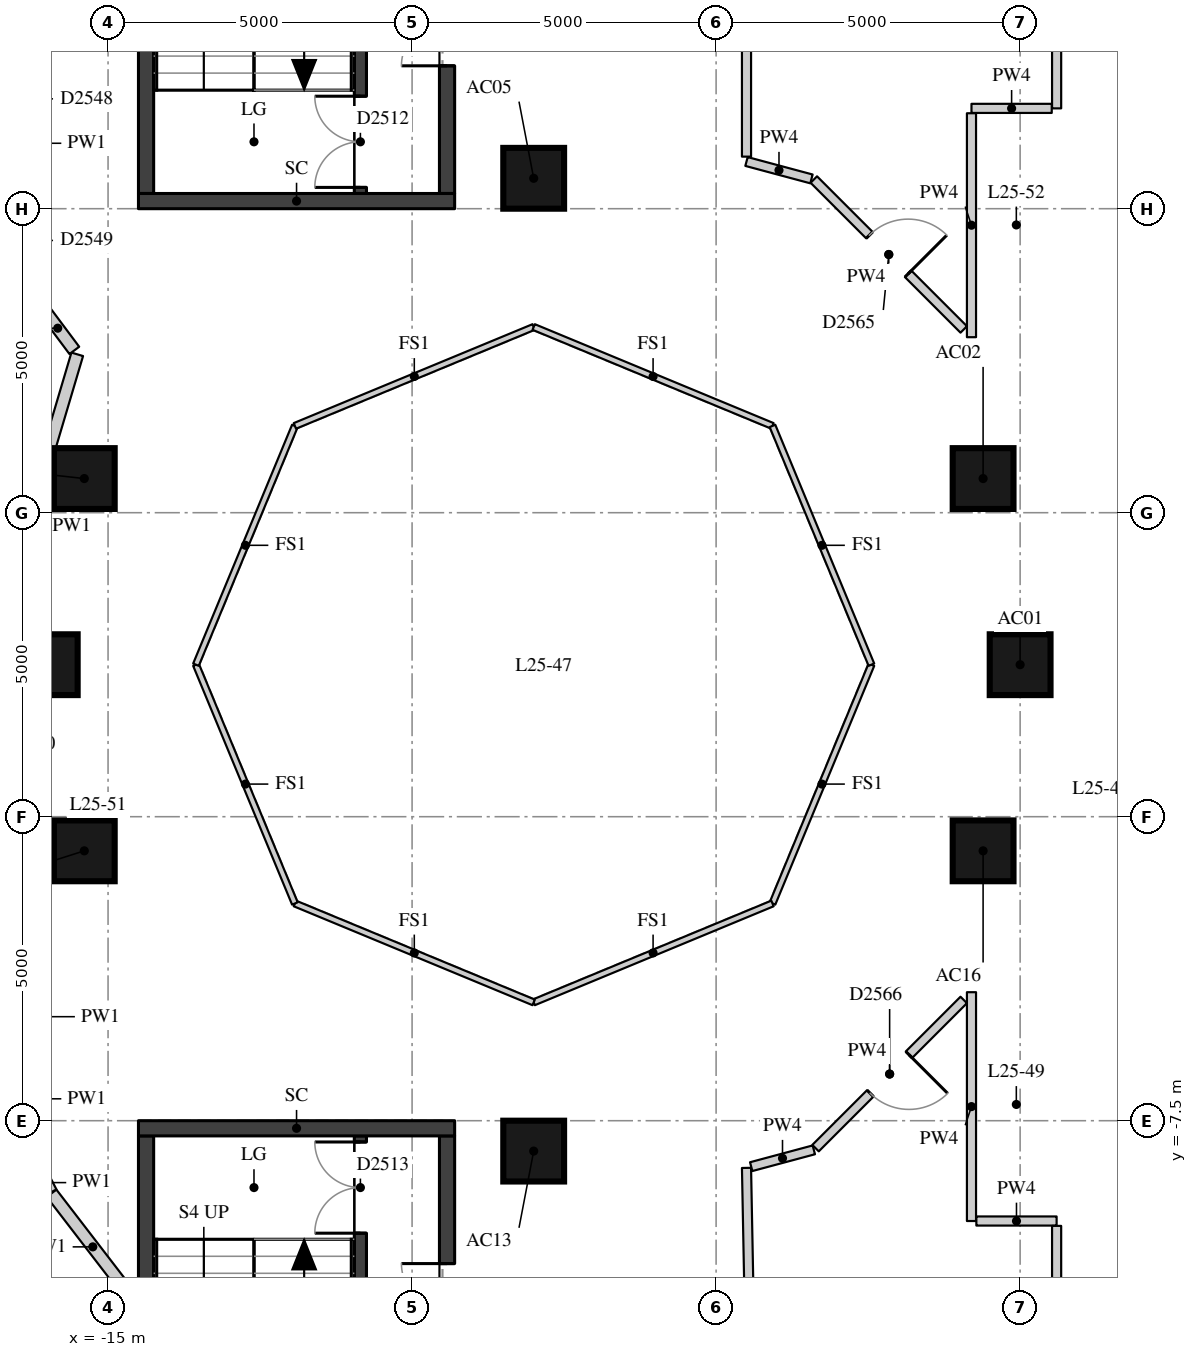
"""IFC4 building model, lengths in metres.
Left out: names, types, materials, properties, quantities, classifications, styles, units other than length and angle.
Written with IfcOpenShell. Run it as: python <this file> out.ifc"""

import sys

from ifc_helpers import new_model, si_unit, direction, frame, frame_2d, origin, origin_2d, place, context, subcontext, project, spatial, rectangle, extrude, element, fill, save


model = new_model("IFC4")
c1 = context("Model", 3, precision=1e-05, world=origin(), true_north=direction((0.0, 1.0)))
c2 = subcontext(c1, "Body", "Model", "MODEL_VIEW")
j1 = project(units=[si_unit("LENGTHUNIT", "METRE"), si_unit("PLANEANGLEUNIT", "RADIAN")], contexts=[c1])
p1 = place(None, origin())
s1 = spatial("IfcSite", under=j1, at=p1, CompositionType="ELEMENT")
p2 = place(p1, origin())
s2 = spatial("IfcBuilding", under=s1, at=p2, CompositionType="ELEMENT")
p3 = place(p2, frame((0.0, 0.0, 92.2)))
s3 = spatial("IfcBuildingStorey", under=s2, at=p3, CompositionType="ELEMENT", Elevation=92.2)
for number, where, z_axis, x_axis in (
    (1, (0.0, 0.0, 0.0), (0.0, 0.0, 1.0), (1.0, 0.0, 0.0)),
    (2, (-0.609, 3.062, 0.0), (0.0, 0.0, 1.0), (1.0, 0.0, 0.0)),
    (3, (-8.0, 8.0, 0.0), (0.0, 0.0, 1.0), (1.0, 0.0, 0.0)),
    (4, (-15.391, 3.062, 0.0), (0.0, 0.0, 1.0), (1.0, 0.0, 0.0)),
    (5, (-16.0, 0.0, 0.0), (0.0, 0.0, 1.0), (1.0, 0.0, 0.0)),
    (6, (-15.391, -3.062, 0.0), (0.0, 0.0, 1.0), (1.0, 0.0, 0.0)),
    (7, (-8.0, -8.0, 0.0), (0.0, 0.0, 1.0), (1.0, 0.0, 0.0)),
    (8, (-0.609, -3.062, 0.0), (0.0, 0.0, 1.0), (1.0, 0.0, 0.0)),
):
    element("IfcColumn", number, at=place(p3, frame(where, z_axis=z_axis, x_axis=x_axis)), inside=s3, PredefinedType="COLUMN", context=c2, shape_type="SweptSolid", body=[
        extrude(rectangle(XDim=1.0, YDim=1.0, at=origin_2d()), origin(), (0.0, 0.0, 1.0), 3.3),
    ])
p4 = place(p3, frame((-10.85, 7.75, 0.0), z_axis=(0.0, 0.0, 1.0), x_axis=(0.0, 1.0, 0.0)))
e9 = element("IfcWall", 9, at=p4, inside=s3, PredefinedType="SHEAR", context=c2, shape_type="SweptSolid", body=[
    extrude(rectangle(XDim=6.0, YDim=0.2, at=frame_2d((3.0, 0.0))), origin(), (0.0, 0.0, 1.0), 3.02),
])
p5 = place(p4, frame((0.1, 0.0, 0.0)))
e10 = element("IfcOpeningElement", 10, at=p5, cuts=e9, PredefinedType="OPENING", context=c2, shape_type="SweptSolid", body=[
    extrude(rectangle(XDim=1.5, YDim=2.1, at=frame_2d((0.75, 1.05))), frame((0.0, 0.11, 0.0), z_axis=(0.0, -1.0, 0.0), x_axis=(1.0, 0.0, 0.0)), (0.0, 0.0, 1.0), 0.22),
])
p6 = place(p3, frame((-10.85, -13.75, 0.0), z_axis=(0.0, 0.0, 1.0), x_axis=(0.0, 1.0, 0.0)))
e11 = element("IfcWall", 11, at=p6, inside=s3, PredefinedType="SHEAR", context=c2, shape_type="SweptSolid", body=[
    extrude(rectangle(XDim=6.0, YDim=0.2, at=frame_2d((3.0, 0.0))), origin(), (0.0, 0.0, 1.0), 3.02),
])
p7 = place(p6, frame((4.4, 0.0, 0.0)))
e12 = element("IfcOpeningElement", 12, at=p7, cuts=e11, PredefinedType="OPENING", context=c2, shape_type="SweptSolid", body=[
    extrude(rectangle(XDim=1.5, YDim=2.1, at=frame_2d((0.75, 1.05))), frame((0.0, 0.11, 0.0), z_axis=(0.0, -1.0, 0.0), x_axis=(1.0, 0.0, 0.0)), (0.0, 0.0, 1.0), 0.22),
])
p8 = place(p3, frame((-14.375, 7.75, -0.28), z_axis=(0.0, 0.0, 1.0), x_axis=(0.0, 1.0, 0.0)))
e13 = element("IfcWall", 13, at=p8, inside=s3, PredefinedType="SHEAR", context=c2, shape_type="SweptSolid", body=[
    extrude(rectangle(XDim=6.0, YDim=0.25, at=frame_2d((3.0, 0.0))), origin(), (0.0, 0.0, 1.0), 3.3),
])
p9 = place(p3, frame((-9.425, 7.75, -0.28), z_axis=(0.0, 0.0, 1.0), x_axis=(0.0, 1.0, 0.0)))
e14 = element("IfcWall", 14, at=p9, inside=s3, PredefinedType="SHEAR", context=c2, shape_type="SweptSolid", body=[
    extrude(rectangle(XDim=6.0, YDim=0.25, at=frame_2d((3.0, 0.0))), origin(), (0.0, 0.0, 1.0), 3.3),
])
p10 = place(p9, frame((2.1, 0.0, 0.28)))
e15 = element("IfcOpeningElement", 15, at=p10, cuts=e14, PredefinedType="OPENING", context=c2, shape_type="SweptSolid", body=[
    extrude(rectangle(XDim=1.5, YDim=2.1, at=frame_2d((0.75, 1.05))), frame((0.0, 0.135, 0.0), z_axis=(0.0, -1.0, 0.0), x_axis=(1.0, 0.0, 0.0)), (0.0, 0.0, 1.0), 0.27),
])
p11 = place(p3, frame((-14.5, 7.625, -0.28), z_axis=(0.0, 0.0, 1.0), x_axis=(1.0, 0.0, 0.0)))
e16 = element("IfcWall", 16, at=p11, inside=s3, PredefinedType="SHEAR", context=c2, shape_type="SweptSolid", body=[
    extrude(rectangle(XDim=5.2, YDim=0.25, at=frame_2d((2.6, 0.0))), origin(), (0.0, 0.0, 1.0), 3.3),
])
p12 = place(p3, frame((-14.375, -13.75, -0.28), z_axis=(0.0, 0.0, 1.0), x_axis=(0.0, 1.0, 0.0)))
e17 = element("IfcWall", 17, at=p12, inside=s3, PredefinedType="SHEAR", context=c2, shape_type="SweptSolid", body=[
    extrude(rectangle(XDim=6.0, YDim=0.25, at=frame_2d((3.0, 0.0))), origin(), (0.0, 0.0, 1.0), 3.3),
])
p13 = place(p3, frame((-9.425, -13.75, -0.28), z_axis=(0.0, 0.0, 1.0), x_axis=(0.0, 1.0, 0.0)))
e18 = element("IfcWall", 18, at=p13, inside=s3, PredefinedType="SHEAR", context=c2, shape_type="SweptSolid", body=[
    extrude(rectangle(XDim=6.0, YDim=0.25, at=frame_2d((3.0, 0.0))), origin(), (0.0, 0.0, 1.0), 3.3),
])
p14 = place(p13, frame((2.4, 0.0, 0.28)))
e19 = element("IfcOpeningElement", 19, at=p14, cuts=e18, PredefinedType="OPENING", context=c2, shape_type="SweptSolid", body=[
    extrude(rectangle(XDim=1.5, YDim=2.1, at=frame_2d((0.75, 1.05))), frame((0.0, 0.135, 0.0), z_axis=(0.0, -1.0, 0.0), x_axis=(1.0, 0.0, 0.0)), (0.0, 0.0, 1.0), 0.27),
])
p15 = place(p3, frame((-14.5, -7.625, -0.28), z_axis=(0.0, 0.0, 1.0), x_axis=(1.0, 0.0, 0.0)))
e20 = element("IfcWall", 20, at=p15, inside=s3, PredefinedType="SHEAR", context=c2, shape_type="SweptSolid", body=[
    extrude(rectangle(XDim=5.2, YDim=0.25, at=frame_2d((2.6, 0.0))), origin(), (0.0, 0.0, 1.0), 3.3),
])
p16 = place(p3, frame((-14.573, -10.456, 0.0), z_axis=(0.0, 0.0, 1.0), x_axis=(-0.60967360535, 0.792652568872, 0.0)))
e21 = element("IfcWall", 21, at=p16, inside=s3, PredefinedType="PARTITIONING", context=c2, shape_type="SweptSolid", body=[
    extrude(rectangle(XDim=2.223, YDim=0.2, at=frame_2d((1.111, 0.0))), origin(), (0.0, 0.0, 1.0), 3.02),
])
p17 = place(p3, frame((-15.938, -8.676, 0.0), z_axis=(0.0, 0.0, 1.0), x_axis=(-0.456525695549, 0.889710227717, 0.0)))
e22 = element("IfcWall", 22, at=p17, inside=s3, PredefinedType="PARTITIONING", context=c2, shape_type="SweptSolid", body=[
    extrude(rectangle(XDim=0.356, YDim=0.2, at=frame_2d((0.178, 0.0))), origin(), (0.0, 0.0, 1.0), 3.02),
])
p18 = place(p3, frame((-17.189, -0.562, 0.0), z_axis=(0.0, 0.0, 1.0), x_axis=(0.28454253649, 0.95866341587, 0.0)))
e23 = element("IfcWall", 23, at=p18, inside=s3, PredefinedType="PARTITIONING", context=c2, shape_type="SweptSolid", body=[
    extrude(rectangle(XDim=5.911, YDim=0.2, at=frame_2d((2.956, 0.0))), origin(), (0.0, 0.0, 1.0), 3.02),
])
p19 = place(p3, frame((-15.555, 5.169, 0.0), z_axis=(0.0, 0.0, 1.0), x_axis=(-0.598284647233, 0.801283645712, 0.0)))
e24 = element("IfcWall", 24, at=p19, inside=s3, PredefinedType="PARTITIONING", context=c2, shape_type="SweptSolid", body=[
    extrude(rectangle(XDim=0.912, YDim=0.2, at=frame_2d((0.456, 0.0))), origin(), (0.0, 0.0, 1.0), 3.02),
])
p20 = place(p3, frame((0.6, 13.205, 0.0), z_axis=(0.0, 0.0, 1.0), x_axis=(0.0, -1.0, 0.0)))
e25 = element("IfcWall", 25, at=p20, inside=s3, PredefinedType="PARTITIONING", context=c2, shape_type="SweptSolid", body=[
    extrude(rectangle(XDim=4.055, YDim=0.15, at=frame_2d((2.027, 0.0))), origin(), (0.0, 0.0, 1.0), 3.02),
])
p21 = place(p3, frame((0.52, 9.15, 0.0), z_axis=(0.0, 0.0, 1.0), x_axis=(-1.0, 0.0, 0.0)))
e26 = element("IfcWall", 26, at=p21, inside=s3, PredefinedType="PARTITIONING", context=c2, shape_type="SweptSolid", body=[
    extrude(rectangle(XDim=1.32, YDim=0.15, at=frame_2d((0.66, 0.0))), origin(), (0.0, 0.0, 1.0), 3.02),
])
p22 = place(p3, frame((-0.8, 9.07, 0.0), z_axis=(0.0, 0.0, 1.0), x_axis=(0.0, -1.0, 0.0)))
e27 = element("IfcWall", 27, at=p22, inside=s3, PredefinedType="PARTITIONING", context=c2, shape_type="SweptSolid", body=[
    extrude(rectangle(XDim=3.683, YDim=0.15, at=frame_2d((1.842, 0.0))), origin(), (0.0, 0.0, 1.0), 3.02),
])
p23 = place(p3, frame((-0.927, 5.514, 0.0), z_axis=(0.0, 0.0, 1.0), x_axis=(-0.707106781187, 0.707106781187, 0.0)))
e28 = element("IfcWall", 28, at=p23, inside=s3, PredefinedType="PARTITIONING", context=c2, shape_type="SweptSolid", body=[
    extrude(rectangle(XDim=3.487, YDim=0.15, at=frame_2d((1.743, 0.0))), origin(), (0.0, 0.0, 1.0), 3.02),
])
p24 = place(p23, frame((1.293, 0.0, 0.0)))
e29 = element("IfcOpeningElement", 29, at=p24, cuts=e28, PredefinedType="OPENING", context=c2, shape_type="SweptSolid", body=[
    extrude(rectangle(XDim=0.9, YDim=2.1, at=frame_2d((0.45, 1.05))), frame((0.0, 0.085, 0.0), z_axis=(0.0, -1.0, 0.0), x_axis=(1.0, 0.0, 0.0)), (0.0, 0.0, 1.0), 0.17),
])
p25 = place(p3, frame((-3.432, 7.99, 0.0), z_axis=(0.0, 0.0, 1.0), x_axis=(-0.965900750832, 0.258912609855, 0.0)))
e30 = element("IfcWall", 30, at=p25, inside=s3, PredefinedType="PARTITIONING", context=c2, shape_type="SweptSolid", body=[
    extrude(rectangle(XDim=1.106, YDim=0.15, at=frame_2d((0.553, 0.0))), origin(), (0.0, 0.0, 1.0), 3.02),
])
p26 = place(p3, frame((-4.5, 8.356, 0.0), z_axis=(0.0, 0.0, 1.0), x_axis=(0.0, 1.0, 0.0)))
e31 = element("IfcWall", 31, at=p26, inside=s3, PredefinedType="PARTITIONING", context=c2, shape_type="SweptSolid", body=[
    extrude(rectangle(XDim=3.631, YDim=0.15, at=frame_2d((1.815, 0.0))), origin(), (0.0, 0.0, 1.0), 3.02),
])
p27 = place(p3, frame((-0.8, -5.386, 0.0), z_axis=(0.0, 0.0, 1.0), x_axis=(0.0, -1.0, 0.0)))
e32 = element("IfcWall", 32, at=p27, inside=s3, PredefinedType="PARTITIONING", context=c2, shape_type="SweptSolid", body=[
    extrude(rectangle(XDim=3.763, YDim=0.15, at=frame_2d((1.882, 0.0))), origin(), (0.0, 0.0, 1.0), 3.02),
])
p28 = place(p3, frame((-0.72, -9.15, 0.0), z_axis=(0.0, 0.0, 1.0), x_axis=(1.0, 0.0, 0.0)))
e33 = element("IfcWall", 33, at=p28, inside=s3, PredefinedType="PARTITIONING", context=c2, shape_type="SweptSolid", body=[
    extrude(rectangle(XDim=1.32, YDim=0.15, at=frame_2d((0.66, 0.0))), origin(), (0.0, 0.0, 1.0), 3.02),
])
p29 = place(p3, frame((0.6, -9.23, 0.0), z_axis=(0.0, 0.0, 1.0), x_axis=(0.0, -1.0, 0.0)))
e34 = element("IfcWall", 34, at=p29, inside=s3, PredefinedType="PARTITIONING", context=c2, shape_type="SweptSolid", body=[
    extrude(rectangle(XDim=4.863, YDim=0.15, at=frame_2d((2.432, 0.0))), origin(), (0.0, 0.0, 1.0), 3.02),
])
p30 = place(p3, frame((-4.42, -12.411, 0.0), z_axis=(0.0, 0.0, 1.0), x_axis=(-0.01930438501, 0.999813652997, 0.0)))
e35 = element("IfcWall", 35, at=p30, inside=s3, PredefinedType="PARTITIONING", context=c2, shape_type="SweptSolid", body=[
    extrude(rectangle(XDim=4.135, YDim=0.15, at=frame_2d((2.068, 0.0))), origin(), (0.0, 0.0, 1.0), 3.02),
])
p31 = place(p3, frame((-4.423, -8.256, 0.0), z_axis=(0.0, 0.0, 1.0), x_axis=(0.965880568435, 0.258987890683, 0.0)))
e36 = element("IfcWall", 36, at=p31, inside=s3, PredefinedType="PARTITIONING", context=c2, shape_type="SweptSolid", body=[
    extrude(rectangle(XDim=1.066, YDim=0.15, at=frame_2d((0.533, 0.0))), origin(), (0.0, 0.0, 1.0), 3.02),
])
p32 = place(p3, frame((-3.365, -7.951, 0.0), z_axis=(0.0, 0.0, 1.0), x_axis=(0.707106781187, 0.707106781187, 0.0)))
e37 = element("IfcWall", 37, at=p32, inside=s3, PredefinedType="PARTITIONING", context=c2, shape_type="SweptSolid", body=[
    extrude(rectangle(XDim=3.447, YDim=0.15, at=frame_2d((1.723, 0.0))), origin(), (0.0, 0.0, 1.0), 3.02),
])
p33 = place(p32, frame((1.273, 0.0, 0.0)))
e38 = element("IfcOpeningElement", 38, at=p33, cuts=e37, PredefinedType="OPENING", context=c2, shape_type="SweptSolid", body=[
    extrude(rectangle(XDim=0.9, YDim=2.1, at=frame_2d((0.45, 1.05))), frame((0.0, 0.085, 0.0), z_axis=(0.0, -1.0, 0.0), x_axis=(1.0, 0.0, 0.0)), (0.0, 0.0, 1.0), 0.17),
])
for number, where, z_axis, x_axis in (
    (39, (-2.446, 0.0, 0.0), (0.0, 0.0, 1.0), (-0.383, -0.924, 0.0)),
    (40, (-4.073, -3.927, 0.0), (0.0, 0.0, 1.0), (-0.924, -0.383, 0.0)),
    (41, (-8.0, -5.554, 0.0), (0.0, 0.0, 1.0), (-0.924, 0.383, 0.0)),
    (42, (-11.927, -3.927, 0.0), (0.0, 0.0, 1.0), (-0.383, 0.924, 0.0)),
    (43, (-13.554, 0.0, 0.0), (0.0, 0.0, 1.0), (0.383, 0.924, 0.0)),
    (44, (-11.927, 3.927, 0.0), (0.0, 0.0, 1.0), (0.924, 0.383, 0.0)),
    (45, (-8.0, 5.554, 0.0), (0.0, 0.0, 1.0), (0.924, -0.383, 0.0)),
    (46, (-4.073, 3.927, 0.0), (0.0, 0.0, 1.0), (0.383, -0.924, 0.0)),
):
    element("IfcWall", number, at=place(p3, frame(where, z_axis=z_axis, x_axis=x_axis)), inside=s3, PredefinedType="PARTITIONING", context=c2, shape_type="SweptSolid", body=[
        extrude(rectangle(XDim=4.251, YDim=0.1, at=frame_2d((2.125, 0.0))), origin(), (0.0, 0.0, 1.0), 3.02),
    ])
p34 = place(p5, origin())
e47 = element("IfcDoor", 47, at=p34, inside=s3, OperationType="DOUBLE_DOOR_SINGLE_SWING", PredefinedType="DOOR", context=c2, shape_type="SweptSolid", body=[
    extrude(rectangle(XDim=1.5, YDim=2.1, at=frame_2d((0.75, 1.05))), frame((0.0, 0.025, 0.0), z_axis=(0.0, -1.0, 0.0), x_axis=(1.0, 0.0, 0.0)), (0.0, 0.0, 1.0), 0.05),
])
fill(e10, e47)
p35 = place(p7, origin())
e48 = element("IfcDoor", 48, at=p35, inside=s3, OperationType="DOUBLE_DOOR_SINGLE_SWING", PredefinedType="DOOR", context=c2, shape_type="SweptSolid", body=[
    extrude(rectangle(XDim=1.5, YDim=2.1, at=frame_2d((0.75, 1.05))), frame((0.0, 0.025, 0.0), z_axis=(0.0, -1.0, 0.0), x_axis=(1.0, 0.0, 0.0)), (0.0, 0.0, 1.0), 0.05),
])
fill(e12, e48)
p36 = place(p10, origin())
e49 = element("IfcDoor", 49, at=p36, inside=s3, OperationType="DOUBLE_DOOR_SINGLE_SWING", PredefinedType="DOOR", context=c2, shape_type="SweptSolid", body=[
    extrude(rectangle(XDim=1.5, YDim=2.1, at=frame_2d((0.75, 1.05))), frame((0.0, 0.025, 0.0), z_axis=(0.0, -1.0, 0.0), x_axis=(1.0, 0.0, 0.0)), (0.0, 0.0, 1.0), 0.05),
])
fill(e15, e49)
p37 = place(p14, origin())
e50 = element("IfcDoor", 50, at=p37, inside=s3, OperationType="DOUBLE_DOOR_SINGLE_SWING", PredefinedType="DOOR", context=c2, shape_type="SweptSolid", body=[
    extrude(rectangle(XDim=1.5, YDim=2.1, at=frame_2d((0.75, 1.05))), frame((0.0, 0.025, 0.0), z_axis=(0.0, -1.0, 0.0), x_axis=(1.0, 0.0, 0.0)), (0.0, 0.0, 1.0), 0.05),
])
fill(e19, e50)
p38 = place(p24, origin())
e51 = element("IfcDoor", 51, at=p38, inside=s3, OperationType="SINGLE_SWING_RIGHT", PredefinedType="DOOR", context=c2, shape_type="SweptSolid", body=[
    extrude(rectangle(XDim=0.9, YDim=2.1, at=frame_2d((0.45, 1.05))), frame((0.0, 0.025, 0.0), z_axis=(0.0, -1.0, 0.0), x_axis=(1.0, 0.0, 0.0)), (0.0, 0.0, 1.0), 0.05),
])
fill(e29, e51)
p39 = place(p33, origin())
e52 = element("IfcDoor", 52, at=p39, inside=s3, OperationType="SINGLE_SWING_LEFT", PredefinedType="DOOR", context=c2, shape_type="SweptSolid", body=[
    extrude(rectangle(XDim=0.9, YDim=2.1, at=frame_2d((0.45, 1.05))), frame((0.0, 0.025, 0.0), z_axis=(0.0, -1.0, 0.0), x_axis=(1.0, 0.0, 0.0)), (0.0, 0.0, 1.0), 0.05),
])
fill(e38, e52)
save(model, sys.argv[1])
